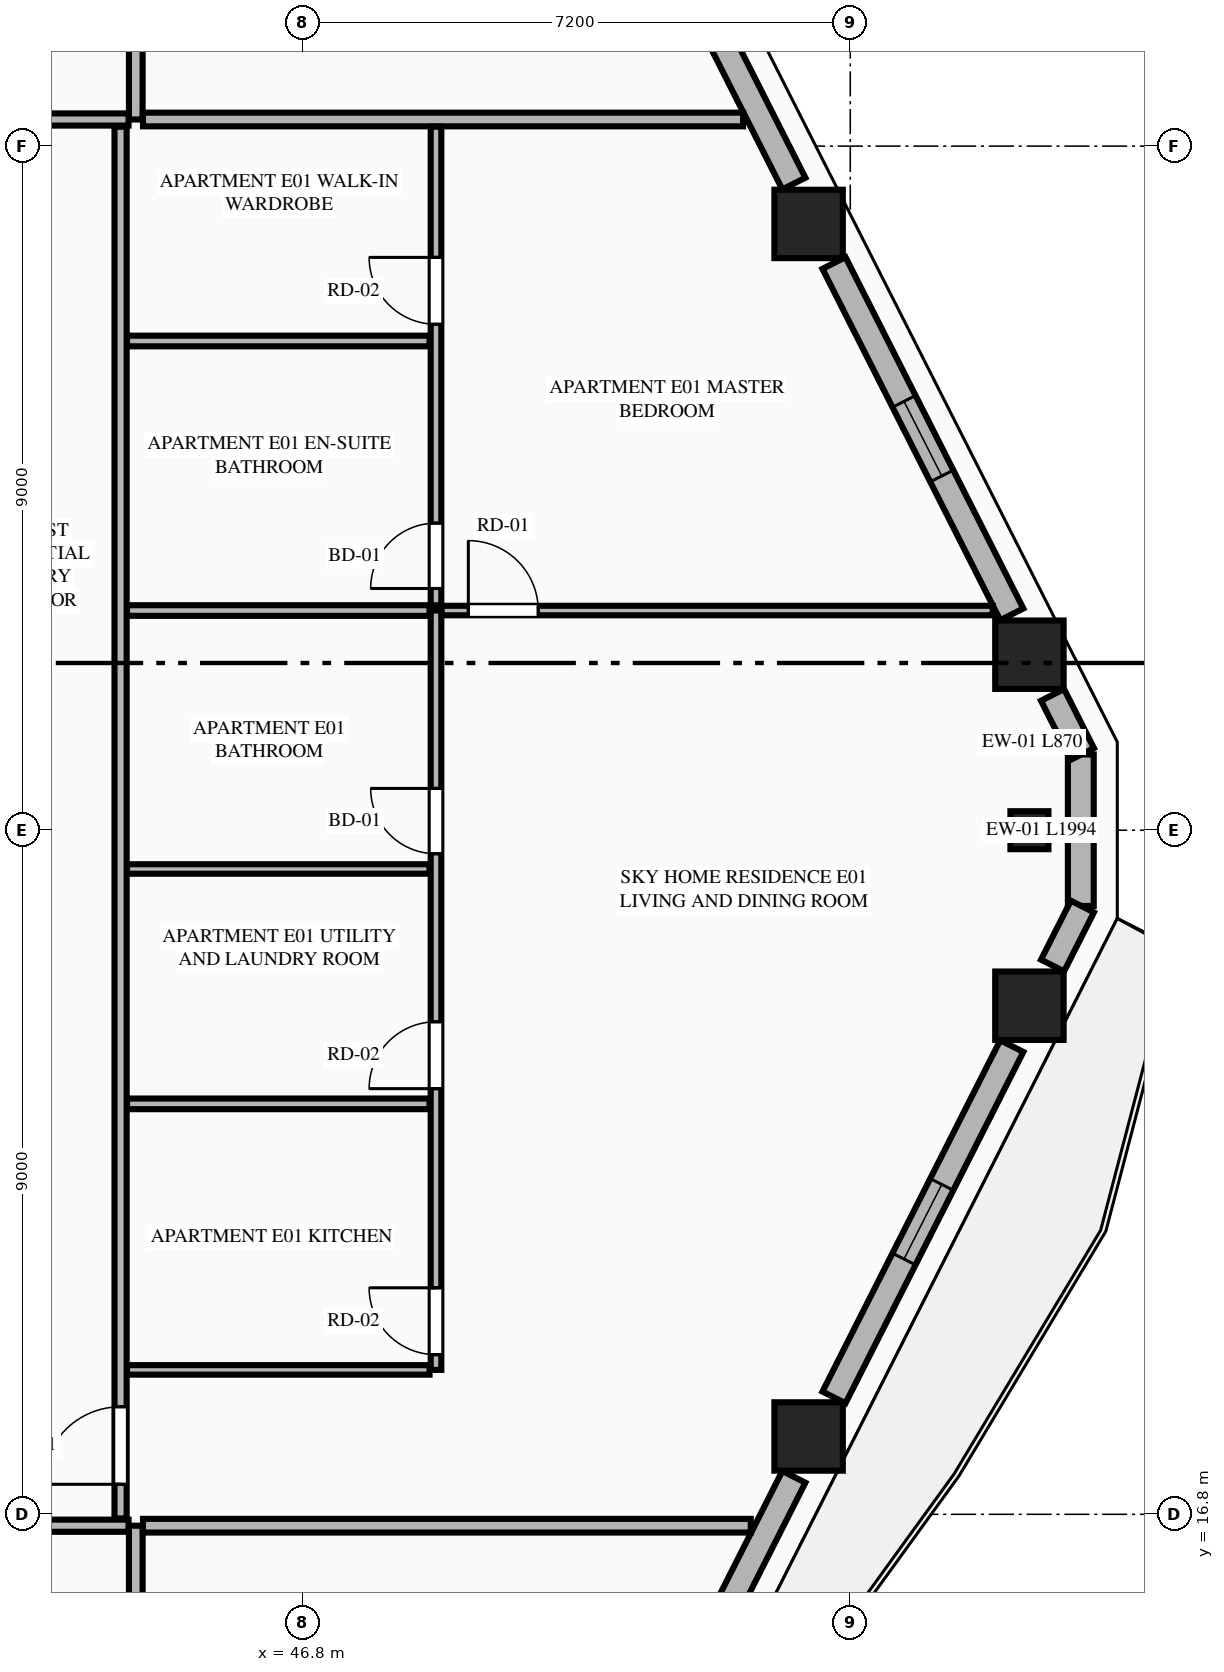
"""IFC4 building model, lengths in metres.
Left out: names, types, materials, properties, quantities, classifications, styles, units other than length and angle.
Written with IfcOpenShell. Run it as: python <this file> out.ifc"""

import sys

from ifc_helpers import new_model, si_unit, direction, frame, frame_2d, origin, origin_2d, place, context, subcontext, project, spatial, rectangle, extrude, element, fill, save


model = new_model("IFC4")
c1 = context("Model", 3, precision=1e-05, world=origin(), true_north=direction((0.0, 1.0)))
c2 = subcontext(c1, "Body", "Model", "MODEL_VIEW")
j1 = project(units=[si_unit("LENGTHUNIT", "METRE"), si_unit("PLANEANGLEUNIT", "RADIAN")], contexts=[c1])
p1 = place(None, origin())
s1 = spatial("IfcSite", under=j1, at=p1, CompositionType="ELEMENT")
p2 = place(p1, origin())
s2 = spatial("IfcBuilding", under=s1, at=p2, CompositionType="ELEMENT")
p3 = place(p2, frame((0.0, 0.0, 160.6)))
s3 = spatial("IfcBuildingStorey", under=s2, at=p3, CompositionType="ELEMENT", Elevation=160.6)
for number, where, z_axis, x_axis in (
    (1, (53.452, 17.824, 0.0), (0.0, 0.0, 1.0), (1.0, 0.0, 0.0)),
    (2, (56.357, 23.491, 0.0), (0.0, 0.0, 1.0), (1.0, 0.0, 0.0)),
    (3, (56.357, 28.109, 0.0), (0.0, 0.0, 1.0), (1.0, 0.0, 0.0)),
    (4, (53.452, 33.776, 0.0), (0.0, 0.0, 1.0), (1.0, 0.0, 0.0)),
):
    element("IfcColumn", number, at=place(p3, frame(where, z_axis=z_axis, x_axis=x_axis)), inside=s3, PredefinedType="COLUMN", context=c2, shape_type="SweptSolid", body=[
        extrude(rectangle(XDim=0.9, YDim=0.9, at=origin_2d()), origin(), (0.0, 0.0, 1.0), 3.55),
    ])
p4 = place(p3, frame((56.357, 25.8, 0.0), z_axis=(0.0, 0.0, 1.0), x_axis=(0.0, 1.0, 0.0)))
e5 = element("IfcColumn", 5, at=p4, inside=s3, PredefinedType="PILASTER", context=c2, shape_type="SweptSolid", body=[
    extrude(rectangle(XDim=0.5, YDim=0.35, at=origin_2d()), origin(), (0.0, 0.0, 1.0), 3.55),
])
p5 = place(p3, frame((57.033, 24.803, 0.0), z_axis=(0.0, 0.0, 1.0), x_axis=(0.0, 1.0, 0.0)))
e6 = element("IfcWall", 6, at=p5, inside=s3, PredefinedType="STANDARD", context=c2, shape_type="SweptSolid", body=[
    extrude(rectangle(XDim=1.994, YDim=0.34, at=frame_2d((0.997, 0.0))), origin(), (0.0, 0.0, 1.0), 3.34),
])
p6 = place(p3, frame((50.818, 12.471, 0.0), z_axis=(0.0, 0.0, 1.0), x_axis=(0.451491174807, 0.892275584711, 0.0)))
e7 = element("IfcWall", 7, at=p6, inside=s3, PredefinedType="STANDARD", context=c2, shape_type="SweptSolid", body=[
    extrude(rectangle(XDim=5.404, YDim=0.34, at=frame_2d((2.702, 0.0))), origin(), (0.0, 0.0, 1.0), 2.797),
])
p7 = place(p6, frame((1.667, 0.0, 0.0)))
e8 = element("IfcOpeningElement", 8, at=p7, cuts=e7, PredefinedType="OPENING", context=c2, shape_type="SweptSolid", body=[
    extrude(rectangle(XDim=1.1, YDim=2.25, at=frame_2d((0.55, 1.125))), frame((0.0, 0.18, 0.0), z_axis=(0.0, -1.0, 0.0), x_axis=(1.0, 0.0, 0.0)), (0.0, 0.0, 1.0), 0.36),
])
p8 = place(p3, frame((53.786, 18.338, 0.0), z_axis=(0.0, 0.0, 1.0), x_axis=(0.451544220963, 0.892248741392, 0.0)))
e9 = element("IfcWall", 9, at=p8, inside=s3, PredefinedType="STANDARD", context=c2, shape_type="SweptSolid", body=[
    extrude(rectangle(XDim=5.18, YDim=0.34, at=frame_2d((2.59, 0.0))), origin(), (0.0, 0.0, 1.0), 2.797),
])
p9 = place(p8, frame((2.04, 0.0, 0.75)))
e10 = element("IfcOpeningElement", 10, at=p9, cuts=e9, PredefinedType="OPENING", context=c2, shape_type="SweptSolid", body=[
    extrude(rectangle(XDim=1.1, YDim=1.897, at=frame_2d((0.55, 0.948))), frame((0.0, 0.18, 0.0), z_axis=(0.0, -1.0, 0.0), x_axis=(1.0, 0.0, 0.0)), (0.0, 0.0, 1.0), 0.36),
])
for number, where, z_axis, x_axis in (
    (11, (56.661, 24.02, 0.0), (0.0, 0.0, 1.0), (0.452, 0.892, 0.0)),
    (12, (57.054, 26.804, 0.0), (0.0, 0.0, 1.0), (-0.452, 0.892, 0.0)),
):
    element("IfcWall", number, at=place(p3, frame(where, z_axis=z_axis, x_axis=x_axis)), inside=s3, PredefinedType="STANDARD", context=c2, shape_type="SweptSolid", body=[
        extrude(rectangle(XDim=0.87, YDim=0.34, at=frame_2d((0.435, 0.0))), origin(), (0.0, 0.0, 1.0), 3.34),
    ])
p10 = place(p3, frame((56.125, 28.64, 0.0), z_axis=(0.0, 0.0, 1.0), x_axis=(-0.451544220963, 0.892248741392, 0.0)))
e13 = element("IfcWall", 13, at=p10, inside=s3, PredefinedType="STANDARD", context=c2, shape_type="SweptSolid", body=[
    extrude(rectangle(XDim=5.18, YDim=0.34, at=frame_2d((2.59, 0.0))), origin(), (0.0, 0.0, 1.0), 2.797),
])
p11 = place(p10, frame((2.04, 0.0, 0.75)))
e14 = element("IfcOpeningElement", 14, at=p11, cuts=e13, PredefinedType="OPENING", context=c2, shape_type="SweptSolid", body=[
    extrude(rectangle(XDim=1.1, YDim=1.897, at=frame_2d((0.55, 0.948))), frame((0.0, 0.18, 0.0), z_axis=(0.0, -1.0, 0.0), x_axis=(1.0, 0.0, 0.0)), (0.0, 0.0, 1.0), 0.36),
])
p12 = place(p3, frame((53.258, 34.307, 0.0), z_axis=(0.0, 0.0, 1.0), x_axis=(-0.451491174807, 0.892275584711, 0.0)))
e15 = element("IfcWall", 15, at=p12, inside=s3, PredefinedType="STANDARD", context=c2, shape_type="SweptSolid", body=[
    extrude(rectangle(XDim=5.404, YDim=0.34, at=frame_2d((2.702, 0.0))), origin(), (0.0, 0.0, 1.0), 2.797),
])
p13 = place(p12, frame((2.152, 0.0, 0.75)))
e16 = element("IfcOpeningElement", 16, at=p13, cuts=e15, PredefinedType="OPENING", context=c2, shape_type="SweptSolid", body=[
    extrude(rectangle(XDim=1.1, YDim=1.897, at=frame_2d((0.55, 0.948))), frame((0.0, 0.18, 0.0), z_axis=(0.0, -1.0, 0.0), x_axis=(1.0, 0.0, 0.0)), (0.0, 0.0, 1.0), 0.36),
])
p14 = place(p3, frame((44.6, 4.105, 0.0), z_axis=(0.0, 0.0, 1.0), x_axis=(0.0, 1.0, 0.0)))
e17 = element("IfcWall", 17, at=p14, inside=s3, PredefinedType="PARTITIONING", context=c2, shape_type="SweptSolid", body=[
    extrude(rectangle(XDim=12.545, YDim=0.18, at=frame_2d((6.272, 0.0))), origin(), (0.0, 0.0, 1.0), 3.34),
])
p15 = place(p3, frame((20.295, 16.65, 0.0), z_axis=(0.0, 0.0, 1.0), x_axis=(1.0, 0.0, 0.0)))
e18 = element("IfcWall", 18, at=p15, inside=s3, PredefinedType="PARTITIONING", context=c2, shape_type="SweptSolid", body=[
    extrude(rectangle(XDim=24.21, YDim=0.16, at=frame_2d((12.105, 0.0))), origin(), (0.0, 0.0, 1.0), 3.34),
])
p16 = place(p15, frame((0.405, 0.0, 0.0)))
e19 = element("IfcOpeningElement", 19, at=p16, cuts=e18, PredefinedType="OPENING", context=c2, shape_type="SweptSolid", body=[
    extrude(rectangle(XDim=1.35, YDim=2.35, at=frame_2d((0.675, 1.175))), frame((0.0, 0.09, 0.0), z_axis=(0.0, -1.0, 0.0), x_axis=(1.0, 0.0, 0.0)), (0.0, 0.0, 1.0), 0.18),
])
p17 = place(p3, frame((44.6, 35.15, 0.0), z_axis=(0.0, 0.0, 1.0), x_axis=(0.0, 1.0, 0.0)))
e20 = element("IfcWall", 20, at=p17, inside=s3, PredefinedType="PARTITIONING", context=c2, shape_type="SweptSolid", body=[
    extrude(rectangle(XDim=12.345, YDim=0.18, at=frame_2d((6.173, 0.0))), origin(), (0.0, 0.0, 1.0), 3.34),
])
p18 = place(p3, frame((20.295, 35.15, 0.0), z_axis=(0.0, 0.0, 1.0), x_axis=(1.0, 0.0, 0.0)))
e21 = element("IfcWall", 21, at=p18, inside=s3, PredefinedType="PARTITIONING", context=c2, shape_type="SweptSolid", body=[
    extrude(rectangle(XDim=24.21, YDim=0.16, at=frame_2d((12.105, 0.0))), origin(), (0.0, 0.0, 1.0), 3.34),
])
p19 = place(p18, frame((0.405, 0.0, 0.0)))
e22 = element("IfcOpeningElement", 22, at=p19, cuts=e21, PredefinedType="OPENING", context=c2, shape_type="SweptSolid", body=[
    extrude(rectangle(XDim=1.35, YDim=2.35, at=frame_2d((0.675, 1.175))), frame((0.0, 0.09, 0.0), z_axis=(0.0, -1.0, 0.0), x_axis=(1.0, 0.0, 0.0)), (0.0, 0.0, 1.0), 0.18),
])
p20 = place(p3, frame((44.695, 16.65, 0.0), z_axis=(0.0, 0.0, 1.0), x_axis=(1.0, 0.0, 0.0)))
e23 = element("IfcWall", 23, at=p20, inside=s3, PredefinedType="PARTITIONING", context=c2, shape_type="SweptSolid", body=[
    extrude(rectangle(XDim=7.996, YDim=0.18, at=frame_2d((3.998, 0.0))), origin(), (0.0, 0.0, 1.0), 3.34),
])
p21 = place(p3, frame((44.695, 35.15, 0.0), z_axis=(0.0, 0.0, 1.0), x_axis=(1.0, 0.0, 0.0)))
e24 = element("IfcWall", 24, at=p21, inside=s3, PredefinedType="PARTITIONING", context=c2, shape_type="SweptSolid", body=[
    extrude(rectangle(XDim=7.895, YDim=0.18, at=frame_2d((3.948, 0.0))), origin(), (0.0, 0.0, 1.0), 3.34),
])
p22 = place(p3, frame((44.4, 16.745, 0.0), z_axis=(0.0, 0.0, 1.0), x_axis=(0.0, 1.0, 0.0)))
e25 = element("IfcWall", 25, at=p22, inside=s3, PredefinedType="PARTITIONING", context=c2, shape_type="SweptSolid", body=[
    extrude(rectangle(XDim=18.31, YDim=0.16, at=frame_2d((9.155, 0.0))), origin(), (0.0, 0.0, 1.0), 3.34),
])
p23 = place(p22, frame((0.45, 0.0, 0.0)))
e26 = element("IfcOpeningElement", 26, at=p23, cuts=e25, PredefinedType="OPENING", context=c2, shape_type="SweptSolid", body=[
    extrude(rectangle(XDim=1.02, YDim=2.25, at=frame_2d((0.51, 1.125))), frame((0.0, 0.09, 0.0), z_axis=(0.0, -1.0, 0.0), x_axis=(1.0, 0.0, 0.0)), (0.0, 0.0, 1.0), 0.18),
])
p24 = place(p3, frame((44.485, 18.7, 0.0), z_axis=(0.0, 0.0, 1.0), x_axis=(1.0, 0.0, 0.0)))
e27 = element("IfcWall", 27, at=p24, inside=s3, PredefinedType="PARTITIONING", context=c2, shape_type="SweptSolid", body=[
    extrude(rectangle(XDim=3.98, YDim=0.125, at=frame_2d((1.99, 0.0))), origin(), (0.0, 0.0, 1.0), 2.722),
])
p25 = place(p3, frame((48.55, 18.7, 0.0), z_axis=(0.0, 0.0, 1.0), x_axis=(0.0, 1.0, 0.0)))
e28 = element("IfcWall", 28, at=p25, inside=s3, PredefinedType="PLUMBINGWALL", context=c2, shape_type="SweptSolid", body=[
    extrude(rectangle(XDim=9.99, YDim=0.14, at=frame_2d((4.995, 0.0))), origin(), (0.0, 0.0, 1.0), 3.34),
])
p26 = place(p25, frame((0.2, 0.0, 0.0)))
e29 = element("IfcOpeningElement", 29, at=p26, cuts=e28, PredefinedType="OPENING", context=c2, shape_type="SweptSolid", body=[
    extrude(rectangle(XDim=0.88, YDim=2.15, at=frame_2d((0.44, 1.075))), frame((0.0, 0.08, 0.0), z_axis=(0.0, -1.0, 0.0), x_axis=(1.0, 0.0, 0.0)), (0.0, 0.0, 1.0), 0.16),
])
p27 = place(p25, frame((3.7, 0.0, 0.0)))
e30 = element("IfcOpeningElement", 30, at=p27, cuts=e28, PredefinedType="OPENING", context=c2, shape_type="SweptSolid", body=[
    extrude(rectangle(XDim=0.88, YDim=2.15, at=frame_2d((0.44, 1.075))), frame((0.0, 0.08, 0.0), z_axis=(0.0, -1.0, 0.0), x_axis=(1.0, 0.0, 0.0)), (0.0, 0.0, 1.0), 0.16),
])
p28 = place(p25, frame((6.79, 0.0, 0.0)))
e31 = element("IfcOpeningElement", 31, at=p28, cuts=e28, PredefinedType="OPENING", context=c2, shape_type="SweptSolid", body=[
    extrude(rectangle(XDim=0.86, YDim=2.1, at=frame_2d((0.43, 1.05))), frame((0.0, 0.08, 0.0), z_axis=(0.0, -1.0, 0.0), x_axis=(1.0, 0.0, 0.0)), (0.0, 0.0, 1.0), 0.16),
])
p29 = place(p3, frame((48.55, 28.76, 0.0), z_axis=(0.0, 0.0, 1.0), x_axis=(0.0, 1.0, 0.0)))
e32 = element("IfcWall", 32, at=p29, inside=s3, PredefinedType="PLUMBINGWALL", context=c2, shape_type="SweptSolid", body=[
    extrude(rectangle(XDim=6.295, YDim=0.14, at=frame_2d((3.147, 0.0))), origin(), (0.0, 0.0, 1.0), 3.34),
])
p30 = place(p29, frame((0.22, 0.0, 0.0)))
e33 = element("IfcOpeningElement", 33, at=p30, cuts=e32, PredefinedType="OPENING", context=c2, shape_type="SweptSolid", body=[
    extrude(rectangle(XDim=0.86, YDim=2.1, at=frame_2d((0.43, 1.05))), frame((0.0, 0.08, 0.0), z_axis=(0.0, -1.0, 0.0), x_axis=(1.0, 0.0, 0.0)), (0.0, 0.0, 1.0), 0.16),
])
p31 = place(p29, frame((3.696, 0.0, 0.0)))
e34 = element("IfcOpeningElement", 34, at=p31, cuts=e32, PredefinedType="OPENING", context=c2, shape_type="SweptSolid", body=[
    extrude(rectangle(XDim=0.88, YDim=2.15, at=frame_2d((0.44, 1.075))), frame((0.0, 0.08, 0.0), z_axis=(0.0, -1.0, 0.0), x_axis=(1.0, 0.0, 0.0)), (0.0, 0.0, 1.0), 0.16),
])
p32 = place(p3, frame((44.485, 28.69, 0.0), z_axis=(0.0, 0.0, 1.0), x_axis=(1.0, 0.0, 0.0)))
e35 = element("IfcWall", 35, at=p32, inside=s3, PredefinedType="PLUMBINGWALL", context=c2, shape_type="SweptSolid", body=[
    extrude(rectangle(XDim=3.98, YDim=0.14, at=frame_2d((1.99, 0.0))), origin(), (0.0, 0.0, 1.0), 3.34),
])
p33 = place(p3, frame((48.625, 28.69, 0.0), z_axis=(0.0, 0.0, 1.0), x_axis=(1.0, 0.0, 0.0)))
e36 = element("IfcWall", 36, at=p33, inside=s3, PredefinedType="PARTITIONING", context=c2, shape_type="SweptSolid", body=[
    extrude(rectangle(XDim=7.249, YDim=0.125, at=frame_2d((3.625, 0.0))), origin(), (0.0, 0.0, 1.0), 3.34),
])
p34 = place(p33, frame((0.35, 0.0, 0.0)))
e37 = element("IfcOpeningElement", 37, at=p34, cuts=e36, PredefinedType="OPENING", context=c2, shape_type="SweptSolid", body=[
    extrude(rectangle(XDim=0.92, YDim=2.15, at=frame_2d((0.46, 1.075))), frame((0.0, 0.073, 0.0), z_axis=(0.0, -1.0, 0.0), x_axis=(1.0, 0.0, 0.0)), (0.0, 0.0, 1.0), 0.145),
])
p35 = place(p3, frame((44.485, 22.2, 0.0), z_axis=(0.0, 0.0, 1.0), x_axis=(1.0, 0.0, 0.0)))
e38 = element("IfcWall", 38, at=p35, inside=s3, PredefinedType="PLUMBINGWALL", context=c2, shape_type="SweptSolid", body=[
    extrude(rectangle(XDim=3.98, YDim=0.14, at=frame_2d((1.99, 0.0))), origin(), (0.0, 0.0, 1.0), 3.34),
])
p36 = place(p3, frame((44.485, 25.29, 0.0), z_axis=(0.0, 0.0, 1.0), x_axis=(1.0, 0.0, 0.0)))
e39 = element("IfcWall", 39, at=p36, inside=s3, PredefinedType="PARTITIONING", context=c2, shape_type="SweptSolid", body=[
    extrude(rectangle(XDim=3.98, YDim=0.125, at=frame_2d((1.99, 0.0))), origin(), (0.0, 0.0, 1.0), 3.34),
])
p37 = place(p3, frame((44.485, 32.236, 0.0), z_axis=(0.0, 0.0, 1.0), x_axis=(1.0, 0.0, 0.0)))
e40 = element("IfcWall", 40, at=p37, inside=s3, PredefinedType="PLUMBINGWALL", context=c2, shape_type="SweptSolid", body=[
    extrude(rectangle(XDim=3.98, YDim=0.14, at=frame_2d((1.99, 0.0))), origin(), (0.0, 0.0, 1.0), 3.34),
])
p38 = place(p9, origin())
e41 = element("IfcWindow", 41, at=p38, inside=s3, PartitioningType="SINGLE_PANEL", PredefinedType="WINDOW", context=c2, shape_type="SweptSolid", body=[
    extrude(rectangle(XDim=1.1, YDim=1.897, at=frame_2d((0.55, 0.948))), frame((0.0, 0.03, 0.0), z_axis=(0.0, -1.0, 0.0), x_axis=(1.0, 0.0, 0.0)), (0.0, 0.0, 1.0), 0.06),
])
fill(e10, e41)
p39 = place(p11, origin())
e42 = element("IfcWindow", 42, at=p39, inside=s3, PartitioningType="SINGLE_PANEL", PredefinedType="WINDOW", context=c2, shape_type="SweptSolid", body=[
    extrude(rectangle(XDim=1.1, YDim=1.897, at=frame_2d((0.55, 0.948))), frame((0.0, 0.03, 0.0), z_axis=(0.0, -1.0, 0.0), x_axis=(1.0, 0.0, 0.0)), (0.0, 0.0, 1.0), 0.06),
])
fill(e14, e42)
p40 = place(p26, origin())
e43 = element("IfcDoor", 43, at=p40, inside=s3, OperationType="SINGLE_SWING_RIGHT", PredefinedType="DOOR", context=c2, shape_type="SweptSolid", body=[
    extrude(rectangle(XDim=0.88, YDim=2.15, at=frame_2d((0.44, 1.075))), frame((0.0, 0.025, 0.0), z_axis=(0.0, -1.0, 0.0), x_axis=(1.0, 0.0, 0.0)), (0.0, 0.0, 1.0), 0.05),
])
fill(e29, e43)
p41 = place(p27, origin())
e44 = element("IfcDoor", 44, at=p41, inside=s3, OperationType="SINGLE_SWING_LEFT", PredefinedType="DOOR", context=c2, shape_type="SweptSolid", body=[
    extrude(rectangle(XDim=0.88, YDim=2.15, at=frame_2d((0.44, 1.075))), frame((0.0, 0.025, 0.0), z_axis=(0.0, -1.0, 0.0), x_axis=(1.0, 0.0, 0.0)), (0.0, 0.0, 1.0), 0.05),
])
fill(e30, e44)
p42 = place(p28, origin())
e45 = element("IfcDoor", 45, at=p42, inside=s3, OperationType="SINGLE_SWING_RIGHT", PredefinedType="DOOR", context=c2, shape_type="SweptSolid", body=[
    extrude(rectangle(XDim=0.86, YDim=2.1, at=frame_2d((0.43, 1.05))), frame((0.0, 0.025, 0.0), z_axis=(0.0, -1.0, 0.0), x_axis=(1.0, 0.0, 0.0)), (0.0, 0.0, 1.0), 0.05),
])
fill(e31, e45)
p43 = place(p30, origin())
e46 = element("IfcDoor", 46, at=p43, inside=s3, OperationType="SINGLE_SWING_LEFT", PredefinedType="DOOR", context=c2, shape_type="SweptSolid", body=[
    extrude(rectangle(XDim=0.86, YDim=2.1, at=frame_2d((0.43, 1.05))), frame((0.0, 0.025, 0.0), z_axis=(0.0, -1.0, 0.0), x_axis=(1.0, 0.0, 0.0)), (0.0, 0.0, 1.0), 0.05),
])
fill(e33, e46)
p44 = place(p31, origin())
e47 = element("IfcDoor", 47, at=p44, inside=s3, OperationType="SINGLE_SWING_RIGHT", PredefinedType="DOOR", context=c2, shape_type="SweptSolid", body=[
    extrude(rectangle(XDim=0.88, YDim=2.15, at=frame_2d((0.44, 1.075))), frame((0.0, 0.025, 0.0), z_axis=(0.0, -1.0, 0.0), x_axis=(1.0, 0.0, 0.0)), (0.0, 0.0, 1.0), 0.05),
])
fill(e34, e47)
p45 = place(p23, origin())
e48 = element("IfcDoor", 48, at=p45, inside=s3, OperationType="SINGLE_SWING_LEFT", PredefinedType="DOOR", context=c2, shape_type="SweptSolid", body=[
    extrude(rectangle(XDim=1.02, YDim=2.25, at=frame_2d((0.51, 1.125))), frame((0.0, 0.025, 0.0), z_axis=(0.0, -1.0, 0.0), x_axis=(1.0, 0.0, 0.0)), (0.0, 0.0, 1.0), 0.05),
])
fill(e26, e48)
p46 = place(p34, origin())
e49 = element("IfcDoor", 49, at=p46, inside=s3, OperationType="SINGLE_SWING_LEFT", PredefinedType="DOOR", context=c2, shape_type="SweptSolid", body=[
    extrude(rectangle(XDim=0.92, YDim=2.15, at=frame_2d((0.46, 1.075))), frame((0.0, 0.025, 0.0), z_axis=(0.0, -1.0, 0.0), x_axis=(1.0, 0.0, 0.0)), (0.0, 0.0, 1.0), 0.05),
])
fill(e37, e49)
save(model, sys.argv[1])
